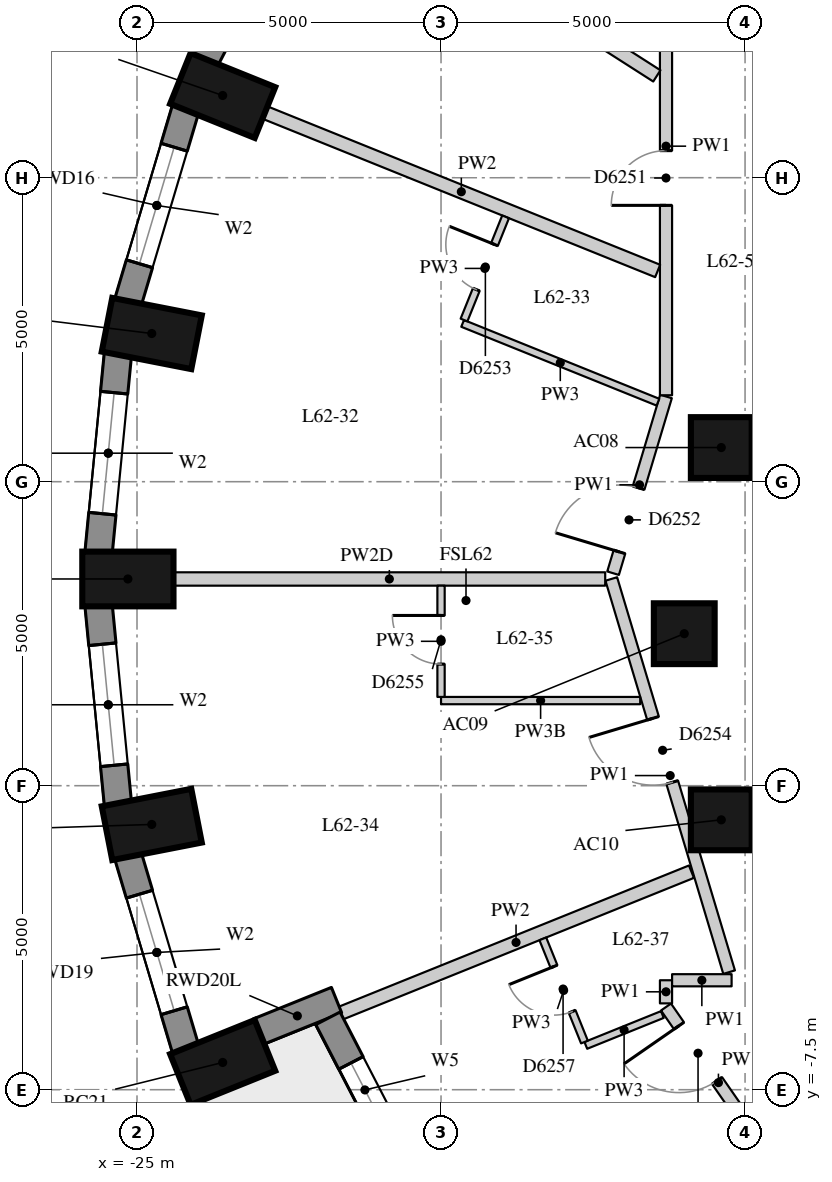
"""IFC4 building model, lengths in metres.
Left out: names, types, materials, properties, quantities, classifications, styles, units other than length and angle.
Written with IfcOpenShell. Run it as: python <this file> out.ifc"""

import sys

from ifc_helpers import new_model, si_unit, direction, frame, frame_2d, origin, origin_2d, place, context, subcontext, project, spatial, rectangle, extrude, element, fill, save


model = new_model("IFC4")
c1 = context("Model", 3, precision=1e-05, world=origin(), true_north=direction((0.0, 1.0)))
c2 = subcontext(c1, "Body", "Model", "MODEL_VIEW")
j1 = project(units=[si_unit("LENGTHUNIT", "METRE"), si_unit("PLANEANGLEUNIT", "RADIAN")], contexts=[c1])
p1 = place(None, origin())
s1 = spatial("IfcSite", under=j1, at=p1, CompositionType="ELEMENT")
p2 = place(p1, origin())
s2 = spatial("IfcBuilding", under=s1, at=p2, CompositionType="ELEMENT")
p3 = place(p2, frame((0.0, 0.0, 218.9)))
s3 = spatial("IfcBuildingStorey", under=s2, at=p3, CompositionType="ELEMENT", Elevation=218.9)
for number, where, z_axis, x_axis in (
    (1, (-23.591, 8.852, 0.0), (0.0, 0.0, 1.0), (-0.927, 0.374, 0.0)),
    (2, (-24.757, 4.937, 0.0), (0.0, 0.0, 1.0), (-0.981, 0.192, 0.0)),
    (3, (-25.15, 0.9, 0.0), (0.0, 0.0, 1.0), (-1.0, 0.0, 0.0)),
    (4, (-24.757, -3.137, 0.0), (0.0, 0.0, 1.0), (-0.981, -0.192, 0.0)),
    (5, (-23.591, -7.052, 0.0), (0.0, 0.0, 1.0), (-0.927, -0.374, 0.0)),
):
    element("IfcColumn", number, at=place(p3, frame(where, z_axis=z_axis, x_axis=x_axis)), inside=s3, PredefinedType="COLUMN", context=c2, shape_type="SweptSolid", body=[
        extrude(rectangle(XDim=1.5, YDim=0.9, at=origin_2d()), origin(), (0.0, 0.0, 1.0), 3.3),
    ])
for number, where, z_axis, x_axis in (
    (6, (-15.391, 3.062, 0.0), (0.0, 0.0, 1.0), (1.0, 0.0, 0.0)),
    (7, (-16.0, 0.0, 0.0), (0.0, 0.0, 1.0), (1.0, 0.0, 0.0)),
    (8, (-15.391, -3.062, 0.0), (0.0, 0.0, 1.0), (1.0, 0.0, 0.0)),
):
    element("IfcColumn", number, at=place(p3, frame(where, z_axis=z_axis, x_axis=x_axis)), inside=s3, PredefinedType="COLUMN", context=c2, shape_type="SweptSolid", body=[
        extrude(rectangle(XDim=1.0, YDim=1.0, at=origin_2d()), origin(), (0.0, 0.0, 1.0), 3.3),
    ])
p4 = place(p3, frame((-22.327, 12.424, 0.0), z_axis=(0.0, 0.0, 1.0), x_axis=(-0.460232593174, -0.887798378113, 0.0)))
e9 = element("IfcWall", 9, at=p4, inside=s3, PredefinedType="SOLIDWALL", context=c2, shape_type="SweptSolid", body=[
    extrude(rectangle(XDim=3.371, YDim=0.45, at=frame_2d((1.685, 0.0))), origin(), (0.0, 0.0, 1.0), 3.02),
])
p5 = place(p4, frame((0.685, 0.0, 0.4)))
e10 = element("IfcOpeningElement", 10, at=p5, cuts=e9, PredefinedType="OPENING", context=c2, shape_type="SweptSolid", body=[
    extrude(rectangle(XDim=2.0, YDim=1.75, at=frame_2d((1.0, 0.875))), frame((0.0, 0.235, 0.0), z_axis=(0.0, -1.0, 0.0), x_axis=(1.0, 0.0, 0.0)), (0.0, 0.0, 1.0), 0.47),
])
p6 = place(p3, frame((-24.2, 8.634, 0.0), z_axis=(0.0, 0.0, 1.0), x_axis=(-0.285444972963, -0.958395099847, 0.0)))
e11 = element("IfcWall", 11, at=p6, inside=s3, PredefinedType="SOLIDWALL", context=c2, shape_type="SweptSolid", body=[
    extrude(rectangle(XDim=3.32, YDim=0.45, at=frame_2d((1.66, 0.0))), origin(), (0.0, 0.0, 1.0), 3.02),
])
p7 = place(p6, frame((0.66, 0.0, 0.4)))
e12 = element("IfcOpeningElement", 12, at=p7, cuts=e11, PredefinedType="OPENING", context=c2, shape_type="SweptSolid", body=[
    extrude(rectangle(XDim=2.0, YDim=1.75, at=frame_2d((1.0, 0.875))), frame((0.0, 0.235, 0.0), z_axis=(0.0, -1.0, 0.0), x_axis=(1.0, 0.0, 0.0)), (0.0, 0.0, 1.0), 0.47),
])
p8 = place(p3, frame((-25.313, 4.608, 0.0), z_axis=(0.0, 0.0, 1.0), x_axis=(-0.096824116835, -0.995301507283, 0.0)))
e13 = element("IfcWall", 13, at=p8, inside=s3, PredefinedType="SOLIDWALL", context=c2, shape_type="SweptSolid", body=[
    extrude(rectangle(XDim=3.293, YDim=0.45, at=frame_2d((1.646, 0.0))), origin(), (0.0, 0.0, 1.0), 3.02),
])
p9 = place(p8, frame((0.646, 0.0, 0.4)))
e14 = element("IfcOpeningElement", 14, at=p9, cuts=e13, PredefinedType="OPENING", context=c2, shape_type="SweptSolid", body=[
    extrude(rectangle(XDim=2.0, YDim=1.75, at=frame_2d((1.0, 0.875))), frame((0.0, 0.235, 0.0), z_axis=(0.0, -1.0, 0.0), x_axis=(1.0, 0.0, 0.0)), (0.0, 0.0, 1.0), 0.47),
])
p10 = place(p3, frame((-25.632, 0.47, 0.0), z_axis=(0.0, 0.0, 1.0), x_axis=(0.096816972749, -0.995302202242, 0.0)))
e15 = element("IfcWall", 15, at=p10, inside=s3, PredefinedType="SOLIDWALL", context=c2, shape_type="SweptSolid", body=[
    extrude(rectangle(XDim=3.293, YDim=0.45, at=frame_2d((1.646, 0.0))), origin(), (0.0, 0.0, 1.0), 3.02),
])
p11 = place(p10, frame((0.646, 0.0, 0.4)))
e16 = element("IfcOpeningElement", 16, at=p11, cuts=e15, PredefinedType="OPENING", context=c2, shape_type="SweptSolid", body=[
    extrude(rectangle(XDim=2.0, YDim=1.75, at=frame_2d((1.0, 0.875))), frame((0.0, 0.235, 0.0), z_axis=(0.0, -1.0, 0.0), x_axis=(1.0, 0.0, 0.0)), (0.0, 0.0, 1.0), 0.47),
])
p12 = place(p3, frame((-25.148, -3.652, 0.0), z_axis=(0.0, 0.0, 1.0), x_axis=(0.285444972963, -0.958395099847, 0.0)))
e17 = element("IfcWall", 17, at=p12, inside=s3, PredefinedType="SOLIDWALL", context=c2, shape_type="SweptSolid", body=[
    extrude(rectangle(XDim=3.32, YDim=0.45, at=frame_2d((1.66, 0.0))), origin(), (0.0, 0.0, 1.0), 3.02),
])
p13 = place(p12, frame((0.66, 0.0, 0.4)))
e18 = element("IfcOpeningElement", 18, at=p13, cuts=e17, PredefinedType="OPENING", context=c2, shape_type="SweptSolid", body=[
    extrude(rectangle(XDim=2.0, YDim=1.75, at=frame_2d((1.0, 0.875))), frame((0.0, 0.235, 0.0), z_axis=(0.0, -1.0, 0.0), x_axis=(1.0, 0.0, 0.0)), (0.0, 0.0, 1.0), 0.47),
])
p14 = place(p3, frame((-23.008, -6.546, 0.0), z_axis=(0.0, 0.0, 1.0), x_axis=(0.927346156366, 0.37420463155, 0.0)))
e19 = element("IfcWall", 19, at=p14, inside=s3, PredefinedType="SOLIDWALL", context=c2, shape_type="SweptSolid", body=[
    extrude(rectangle(XDim=1.39, YDim=0.45, at=frame_2d((0.695, 0.0))), origin(), (0.0, 0.0, 1.0), 3.02),
])
p15 = place(p3, frame((-21.861, -6.326, 0.0), z_axis=(0.0, 0.0, 1.0), x_axis=(0.45924645187, -0.888308896975, 0.0)))
e20 = element("IfcWall", 20, at=p15, inside=s3, PredefinedType="SOLIDWALL", context=c2, shape_type="SweptSolid", body=[
    extrude(rectangle(XDim=3.802, YDim=0.45, at=frame_2d((1.901, 0.0))), origin(), (0.0, 0.0, 1.0), 3.02),
])
p16 = place(p15, frame((0.826, 0.0, 0.4)))
e21 = element("IfcOpeningElement", 21, at=p16, cuts=e20, PredefinedType="OPENING", context=c2, shape_type="SweptSolid", body=[
    extrude(rectangle(XDim=1.0, YDim=1.75, at=frame_2d((0.5, 0.875))), frame((0.0, 0.235, 0.0), z_axis=(0.0, -1.0, 0.0), x_axis=(1.0, 0.0, 0.0)), (0.0, 0.0, 1.0), 0.47),
])
p17 = place(p15, frame((1.976, 0.0, 0.0)))
e22 = element("IfcOpeningElement", 22, at=p17, cuts=e20, PredefinedType="OPENING", context=c2, shape_type="SweptSolid", body=[
    extrude(rectangle(XDim=1.0, YDim=2.15, at=frame_2d((0.5, 1.075))), frame((0.0, 0.235, 0.0), z_axis=(0.0, -1.0, 0.0), x_axis=(1.0, 0.0, 0.0)), (0.0, 0.0, 1.0), 0.47),
])
p18 = place(p3, frame((-14.575, -8.627, 0.0), z_axis=(0.0, 0.0, 1.0), x_axis=(-0.569910381143, 0.821706856163, 0.0)))
e23 = element("IfcWall", 23, at=p18, inside=s3, PredefinedType="PARTITIONING", context=c2, shape_type="SweptSolid", body=[
    extrude(rectangle(XDim=3.026, YDim=0.2, at=frame_2d((1.513, 0.0))), origin(), (0.0, 0.0, 1.0), 3.02),
])
p19 = place(p18, frame((1.552, 0.0, 0.0)))
e24 = element("IfcOpeningElement", 24, at=p19, cuts=e23, PredefinedType="OPENING", context=c2, shape_type="SweptSolid", body=[
    extrude(rectangle(XDim=1.1, YDim=2.1, at=frame_2d((0.55, 1.05))), frame((0.0, 0.11, 0.0), z_axis=(0.0, -1.0, 0.0), x_axis=(1.0, 0.0, 0.0)), (0.0, 0.0, 1.0), 0.22),
])
p20 = place(p3, frame((-16.3, -6.08, 0.0), z_axis=(0.0, 0.0, 1.0), x_axis=(0.0, 1.0, 0.0)))
e25 = element("IfcWall", 25, at=p20, inside=s3, PredefinedType="PARTITIONING", context=c2, shape_type="SweptSolid", body=[
    extrude(rectangle(XDim=0.38, YDim=0.2, at=frame_2d((0.19, 0.0))), origin(), (0.0, 0.0, 1.0), 3.02),
])
p21 = place(p3, frame((-16.2, -5.7, 0.0), z_axis=(0.0, 0.0, 1.0), x_axis=(1.0, 0.0, 0.0)))
e26 = element("IfcWall", 26, at=p21, inside=s3, PredefinedType="PARTITIONING", context=c2, shape_type="SweptSolid", body=[
    extrude(rectangle(XDim=0.979, YDim=0.2, at=frame_2d((0.489, 0.0))), origin(), (0.0, 0.0, 1.0), 3.02),
])
p22 = place(p3, frame((-15.262, -5.567, 0.0), z_axis=(0.0, 0.0, 1.0), x_axis=(-0.28704593875, 0.957916817395, 0.0)))
e27 = element("IfcWall", 27, at=p22, inside=s3, PredefinedType="PARTITIONING", context=c2, shape_type="SweptSolid", body=[
    extrude(rectangle(XDim=6.751, YDim=0.2, at=frame_2d((3.375, 0.0))), origin(), (0.0, 0.0, 1.0), 3.02),
])
p23 = place(p22, frame((3.259, 0.0, 0.0)))
e28 = element("IfcOpeningElement", 28, at=p23, cuts=e27, PredefinedType="OPENING", context=c2, shape_type="SweptSolid", body=[
    extrude(rectangle(XDim=1.1, YDim=2.1, at=frame_2d((0.55, 1.05))), frame((0.0, 0.11, 0.0), z_axis=(0.0, -1.0, 0.0), x_axis=(1.0, 0.0, 0.0)), (0.0, 0.0, 1.0), 0.22),
])
p24 = place(p3, frame((-17.171, 0.995, 0.0), z_axis=(0.0, 0.0, 1.0), x_axis=(0.286919722033, 0.957954629984, 0.0)))
e29 = element("IfcWall", 29, at=p24, inside=s3, PredefinedType="PARTITIONING", context=c2, shape_type="SweptSolid", body=[
    extrude(rectangle(XDim=3.034, YDim=0.2, at=frame_2d((1.517, 0.0))), origin(), (0.0, 0.0, 1.0), 3.02),
])
p25 = place(p24, frame((0.365, 0.0, 0.0)))
e30 = element("IfcOpeningElement", 30, at=p25, cuts=e29, PredefinedType="OPENING", context=c2, shape_type="SweptSolid", body=[
    extrude(rectangle(XDim=1.1, YDim=2.1, at=frame_2d((0.55, 1.05))), frame((0.0, 0.11, 0.0), z_axis=(0.0, -1.0, 0.0), x_axis=(1.0, 0.0, 0.0)), (0.0, 0.0, 1.0), 0.22),
])
p26 = place(p3, frame((-16.3, 3.922, 0.0), z_axis=(0.0, 0.0, 1.0), x_axis=(0.0, 1.0, 0.0)))
e31 = element("IfcWall", 31, at=p26, inside=s3, PredefinedType="PARTITIONING", context=c2, shape_type="SweptSolid", body=[
    extrude(rectangle(XDim=8.193, YDim=0.2, at=frame_2d((4.097, 0.0))), origin(), (0.0, 0.0, 1.0), 3.02),
])
p27 = place(p26, frame((6.953, 0.0, 0.0)))
e32 = element("IfcOpeningElement", 32, at=p27, cuts=e31, PredefinedType="OPENING", context=c2, shape_type="SweptSolid", body=[
    extrude(rectangle(XDim=1.1, YDim=2.1, at=frame_2d((0.55, 1.05))), frame((0.0, 0.11, 0.0), z_axis=(0.0, -1.0, 0.0), x_axis=(1.0, 0.0, 0.0)), (0.0, 0.0, 1.0), 0.22),
])
p28 = place(p26, frame((3.123, 0.0, 0.0)))
e33 = element("IfcOpeningElement", 33, at=p28, cuts=e31, PredefinedType="OPENING", context=c2, shape_type="SweptSolid", body=[
    extrude(rectangle(XDim=0.9, YDim=2.1, at=frame_2d((0.45, 1.05))), frame((0.0, 0.11, 0.0), z_axis=(0.0, -1.0, 0.0), x_axis=(1.0, 0.0, 0.0)), (0.0, 0.0, 1.0), 0.22),
])
p29 = place(p3, frame((-21.055, 12.121, 0.0), z_axis=(0.0, 0.0, 1.0), x_axis=(0.842286811608, -0.539029616061, 0.0)))
e34 = element("IfcWall", 34, at=p29, inside=s3, PredefinedType="PARTITIONING", context=c2, shape_type="SweptSolid", body=[
    extrude(rectangle(XDim=5.466, YDim=0.22, at=frame_2d((2.733, 0.0))), origin(), (0.0, 0.0, 1.0), 3.02),
])
p30 = place(p3, frame((-22.896, 8.571, 0.0), z_axis=(0.0, 0.0, 1.0), x_axis=(0.927387137769, -0.374103056256, 0.0)))
e35 = element("IfcWall", 35, at=p30, inside=s3, PredefinedType="PARTITIONING", context=c2, shape_type="SweptSolid", body=[
    extrude(rectangle(XDim=6.964, YDim=0.22, at=frame_2d((3.482, 0.0))), origin(), (0.0, 0.0, 1.0), 3.02),
])
p31 = place(p3, frame((-24.4, 0.9, 0.0), z_axis=(0.0, 0.0, 1.0), x_axis=(1.0, 0.0, 0.0)))
e36 = element("IfcWall", 36, at=p31, inside=s3, PredefinedType="PARTITIONING", context=c2, shape_type="SweptSolid", body=[
    extrude(rectangle(XDim=7.1, YDim=0.22, at=frame_2d((3.55, 0.0))), origin(), (0.0, 0.0, 1.0), 2.47),
])
p32 = place(p3, frame((-21.651, -6.241, 0.0), z_axis=(0.0, 0.0, 1.0), x_axis=(0.927390089179, 0.37409573974, 0.0)))
e37 = element("IfcWall", 37, at=p32, inside=s3, PredefinedType="PARTITIONING", context=c2, shape_type="SweptSolid", body=[
    extrude(rectangle(XDim=6.221, YDim=0.22, at=frame_2d((3.11, 0.0))), origin(), (0.0, 0.0, 1.0), 3.02),
])
p33 = place(p3, frame((-16.433, 3.808, 0.0), z_axis=(0.0, 0.0, 1.0), x_axis=(-0.927374031513, 0.374135544522, 0.0)))
e38 = element("IfcWall", 38, at=p33, inside=s3, PredefinedType="PARTITIONING", context=c2, shape_type="SweptSolid", body=[
    extrude(rectangle(XDim=3.464, YDim=0.12, at=frame_2d((1.732, 0.0))), origin(), (0.0, 0.0, 1.0), 3.02),
])
p34 = place(p3, frame((-16.725, -1.1, 0.0), z_axis=(0.0, 0.0, 1.0), x_axis=(-1.0, 0.0, 0.0)))
e39 = element("IfcWall", 39, at=p34, inside=s3, PredefinedType="PARTITIONING", context=c2, shape_type="SweptSolid", body=[
    extrude(rectangle(XDim=3.275, YDim=0.12, at=frame_2d((1.638, 0.0))), origin(), (0.0, 0.0, 1.0), 2.47),
])
p35 = place(p3, frame((-16.36, -6.264, 0.0), z_axis=(0.0, 0.0, 1.0), x_axis=(-0.927381089245, -0.374118049967, 0.0)))
e40 = element("IfcWall", 40, at=p35, inside=s3, PredefinedType="PARTITIONING", context=c2, shape_type="SweptSolid", body=[
    extrude(rectangle(XDim=1.357, YDim=0.12, at=frame_2d((0.679, 0.0))), origin(), (0.0, 0.0, 1.0), 3.02),
])
p36 = place(p3, frame((-19.622, 5.159, 0.0), z_axis=(0.0, 0.0, 1.0), x_axis=(0.373873925611, 0.927479534948, 0.0)))
e41 = element("IfcWall", 41, at=p36, inside=s3, PredefinedType="PARTITIONING", context=c2, shape_type="SweptSolid", body=[
    extrude(rectangle(XDim=1.83, YDim=0.12, at=frame_2d((0.915, 0.0))), origin(), (0.0, 0.0, 1.0), 3.02),
])
p37 = place(p36, frame((0.54, 0.0, 0.0)))
e42 = element("IfcOpeningElement", 42, at=p37, cuts=e41, PredefinedType="OPENING", context=c2, shape_type="SweptSolid", body=[
    extrude(rectangle(XDim=0.8, YDim=2.1, at=frame_2d((0.4, 1.05))), frame((0.0, 0.07, 0.0), z_axis=(0.0, -1.0, 0.0), x_axis=(1.0, 0.0, 0.0)), (0.0, 0.0, 1.0), 0.14),
])
p38 = place(p3, frame((-20.0, -1.04, 0.0), z_axis=(0.0, 0.0, 1.0), x_axis=(0.0, 1.0, 0.0)))
e43 = element("IfcWall", 43, at=p38, inside=s3, PredefinedType="PARTITIONING", context=c2, shape_type="SweptSolid", body=[
    extrude(rectangle(XDim=1.83, YDim=0.12, at=frame_2d((0.915, 0.0))), origin(), (0.0, 0.0, 1.0), 3.02),
])
p39 = place(p38, frame((0.54, 0.0, 0.0)))
e44 = element("IfcOpeningElement", 44, at=p39, cuts=e43, PredefinedType="OPENING", context=c2, shape_type="SweptSolid", body=[
    extrude(rectangle(XDim=0.8, YDim=2.1, at=frame_2d((0.4, 1.05))), frame((0.0, 0.07, 0.0), z_axis=(0.0, -1.0, 0.0), x_axis=(1.0, 0.0, 0.0)), (0.0, 0.0, 1.0), 0.14),
])
p40 = place(p3, frame((-17.641, -6.716, 0.0), z_axis=(0.0, 0.0, 1.0), x_axis=(-0.374103450988, 0.927386978536, 0.0)))
e45 = element("IfcWall", 45, at=p40, inside=s3, PredefinedType="PARTITIONING", context=c2, shape_type="SweptSolid", body=[
    extrude(rectangle(XDim=1.83, YDim=0.12, at=frame_2d((0.915, 0.0))), origin(), (0.0, 0.0, 1.0), 3.02),
])
p41 = place(p40, frame((0.54, 0.0, 0.0)))
e46 = element("IfcOpeningElement", 46, at=p41, cuts=e45, PredefinedType="OPENING", context=c2, shape_type="SweptSolid", body=[
    extrude(rectangle(XDim=0.8, YDim=2.1, at=frame_2d((0.4, 1.05))), frame((0.0, 0.07, 0.0), z_axis=(0.0, -1.0, 0.0), x_axis=(1.0, 0.0, 0.0)), (0.0, 0.0, 1.0), 0.14),
])
p42 = place(p7, origin())
e47 = element("IfcWindow", 47, at=p42, inside=s3, PartitioningType="SINGLE_PANEL", PredefinedType="WINDOW", context=c2, shape_type="SweptSolid", body=[
    extrude(rectangle(XDim=2.0, YDim=1.75, at=frame_2d((1.0, 0.875))), frame((0.0, 0.035, 0.0), z_axis=(0.0, -1.0, 0.0), x_axis=(1.0, 0.0, 0.0)), (0.0, 0.0, 1.0), 0.06),
])
fill(e12, e47)
p43 = place(p9, origin())
e48 = element("IfcWindow", 48, at=p43, inside=s3, PartitioningType="SINGLE_PANEL", PredefinedType="WINDOW", context=c2, shape_type="SweptSolid", body=[
    extrude(rectangle(XDim=2.0, YDim=1.75, at=frame_2d((1.0, 0.875))), frame((0.0, 0.035, 0.0), z_axis=(0.0, -1.0, 0.0), x_axis=(1.0, 0.0, 0.0)), (0.0, 0.0, 1.0), 0.06),
])
fill(e14, e48)
p44 = place(p11, origin())
e49 = element("IfcWindow", 49, at=p44, inside=s3, PartitioningType="SINGLE_PANEL", PredefinedType="WINDOW", context=c2, shape_type="SweptSolid", body=[
    extrude(rectangle(XDim=2.0, YDim=1.75, at=frame_2d((1.0, 0.875))), frame((0.0, 0.035, 0.0), z_axis=(0.0, -1.0, 0.0), x_axis=(1.0, 0.0, 0.0)), (0.0, 0.0, 1.0), 0.06),
])
fill(e16, e49)
p45 = place(p13, origin())
e50 = element("IfcWindow", 50, at=p45, inside=s3, PartitioningType="SINGLE_PANEL", PredefinedType="WINDOW", context=c2, shape_type="SweptSolid", body=[
    extrude(rectangle(XDim=2.0, YDim=1.75, at=frame_2d((1.0, 0.875))), frame((0.0, 0.035, 0.0), z_axis=(0.0, -1.0, 0.0), x_axis=(1.0, 0.0, 0.0)), (0.0, 0.0, 1.0), 0.06),
])
fill(e18, e50)
p46 = place(p16, origin())
e51 = element("IfcWindow", 51, at=p46, inside=s3, PartitioningType="SINGLE_PANEL", PredefinedType="WINDOW", context=c2, shape_type="SweptSolid", body=[
    extrude(rectangle(XDim=1.0, YDim=1.75, at=frame_2d((0.5, 0.875))), frame((0.0, 0.035, 0.0), z_axis=(0.0, -1.0, 0.0), x_axis=(1.0, 0.0, 0.0)), (0.0, 0.0, 1.0), 0.06),
])
fill(e21, e51)
p47 = place(p28, origin())
e52 = element("IfcDoor", 52, at=p47, inside=s3, OperationType="SINGLE_SWING_LEFT", PredefinedType="DOOR", context=c2, shape_type="SweptSolid", body=[
    extrude(rectangle(XDim=0.9, YDim=2.1, at=frame_2d((0.45, 1.05))), frame((0.0, 0.025, 0.0), z_axis=(0.0, -1.0, 0.0), x_axis=(1.0, 0.0, 0.0)), (0.0, 0.0, 1.0), 0.05),
])
fill(e33, e52)
p48 = place(p25, origin())
e53 = element("IfcDoor", 53, at=p48, inside=s3, OperationType="SINGLE_SWING_LEFT", PredefinedType="DOOR", context=c2, shape_type="SweptSolid", body=[
    extrude(rectangle(XDim=1.1, YDim=2.1, at=frame_2d((0.55, 1.05))), frame((0.0, 0.025, 0.0), z_axis=(0.0, -1.0, 0.0), x_axis=(1.0, 0.0, 0.0)), (0.0, 0.0, 1.0), 0.05),
])
fill(e30, e53)
p49 = place(p37, origin())
e54 = element("IfcDoor", 54, at=p49, inside=s3, OperationType="SINGLE_SWING_RIGHT", PredefinedType="DOOR", context=c2, shape_type="SweptSolid", body=[
    extrude(rectangle(XDim=0.8, YDim=2.1, at=frame_2d((0.4, 1.05))), frame((0.0, 0.025, 0.0), z_axis=(0.0, -1.0, 0.0), x_axis=(1.0, 0.0, 0.0)), (0.0, 0.0, 1.0), 0.05),
])
fill(e42, e54)
p50 = place(p23, origin())
e55 = element("IfcDoor", 55, at=p50, inside=s3, OperationType="SINGLE_SWING_RIGHT", PredefinedType="DOOR", context=c2, shape_type="SweptSolid", body=[
    extrude(rectangle(XDim=1.1, YDim=2.1, at=frame_2d((0.55, 1.05))), frame((0.0, 0.025, 0.0), z_axis=(0.0, -1.0, 0.0), x_axis=(1.0, 0.0, 0.0)), (0.0, 0.0, 1.0), 0.05),
])
fill(e28, e55)
p51 = place(p39, origin())
e56 = element("IfcDoor", 56, at=p51, inside=s3, OperationType="SINGLE_SWING_RIGHT", PredefinedType="DOOR", context=c2, shape_type="SweptSolid", body=[
    extrude(rectangle(XDim=0.8, YDim=2.1, at=frame_2d((0.4, 1.05))), frame((0.0, 0.025, 0.0), z_axis=(0.0, -1.0, 0.0), x_axis=(1.0, 0.0, 0.0)), (0.0, 0.0, 1.0), 0.05),
])
fill(e44, e56)
p52 = place(p19, origin())
e57 = element("IfcDoor", 57, at=p52, inside=s3, OperationType="SINGLE_SWING_RIGHT", PredefinedType="DOOR", context=c2, shape_type="SweptSolid", body=[
    extrude(rectangle(XDim=1.1, YDim=2.1, at=frame_2d((0.55, 1.05))), frame((0.0, 0.025, 0.0), z_axis=(0.0, -1.0, 0.0), x_axis=(1.0, 0.0, 0.0)), (0.0, 0.0, 1.0), 0.05),
])
fill(e24, e57)
p53 = place(p41, origin())
e58 = element("IfcDoor", 58, at=p53, inside=s3, OperationType="SINGLE_SWING_RIGHT", PredefinedType="DOOR", context=c2, shape_type="SweptSolid", body=[
    extrude(rectangle(XDim=0.8, YDim=2.1, at=frame_2d((0.4, 1.05))), frame((0.0, 0.025, 0.0), z_axis=(0.0, -1.0, 0.0), x_axis=(1.0, 0.0, 0.0)), (0.0, 0.0, 1.0), 0.05),
])
fill(e46, e58)
save(model, sys.argv[1])
